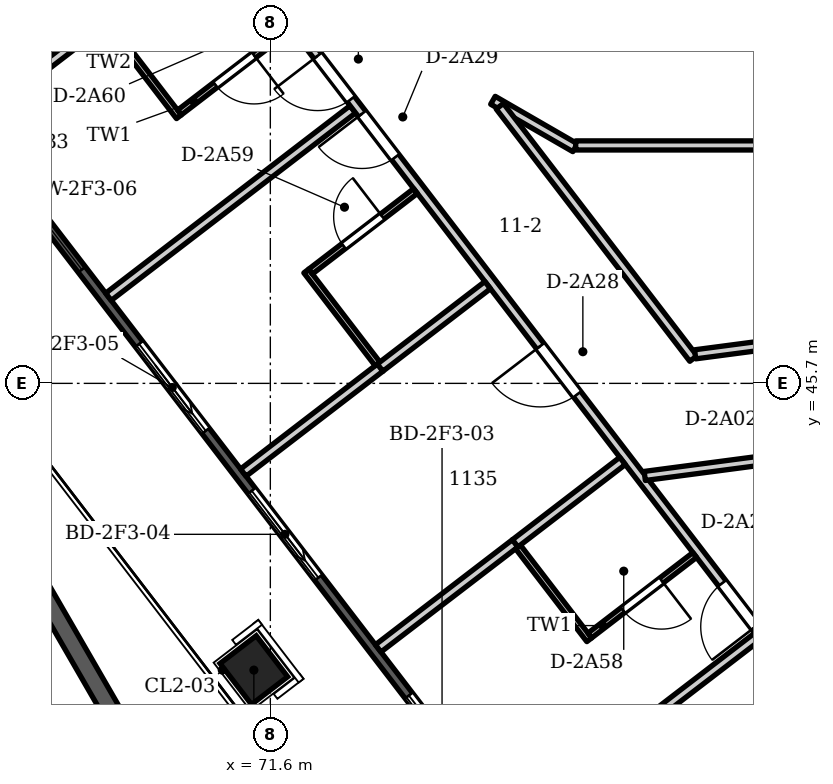
"""IFC4 building model, lengths in metres.
Left out: names, types, materials, properties, quantities, classifications, styles, units other than length and angle.
Written with IfcOpenShell. Run it as: python <this file> out.ifc"""

import sys

from ifc_helpers import new_model, si_unit, direction, frame, frame_2d, origin, origin_2d, place, context, subcontext, project, spatial, polyline, rectangle, outline, extrude, element, fill, save


model = new_model("IFC4")
c1 = context("Model", 3, precision=1e-05, world=origin(), true_north=direction((0.0, 1.0)))
c2 = subcontext(c1, "Body", "Model", "MODEL_VIEW")
j1 = project(units=[si_unit("LENGTHUNIT", "METRE"), si_unit("PLANEANGLEUNIT", "RADIAN")], contexts=[c1])
p1 = place(None, origin())
s1 = spatial("IfcSite", under=j1, at=p1, CompositionType="ELEMENT")
p2 = place(p1, origin())
s2 = spatial("IfcBuilding", under=s1, at=p2, CompositionType="ELEMENT")
p3 = place(p2, frame((0.0, 0.0, 50.4)))
s3 = spatial("IfcBuildingStorey", under=s2, at=p3, CompositionType="ELEMENT", Elevation=50.4)
p4 = place(p3, frame((71.329, 40.985, -0.35), z_axis=(0.0, 0.0, 1.0), x_axis=(-0.608761429009, 0.793353340291, 0.0)))
e1 = element("IfcColumn", 1, at=p4, inside=s3, PredefinedType="COLUMN", context=c2, shape_type="SweptSolid", body=[
    extrude(rectangle(XDim=0.85, YDim=0.75, at=origin_2d()), origin(), (0.0, 0.0, 1.0), 3.95),
])
p5 = place(p3, frame((79.969, 32.624, 0.0), z_axis=(0.0, 0.0, 1.0), x_axis=(-0.608761526367, 0.793353265585, 0.0)))
e2 = element("IfcWall", 2, at=p5, inside=s3, PredefinedType="SOLIDWALL", context=c2, shape_type="SweptSolid", body=[
    extrude(outline(polyline([(0.149, 0.075), (0.149, -0.075), (47.217, -0.075), (47.217, 0.075), (0.149, 0.075)])), origin(), (0.0, 0.0, 1.0), 3.3),
])
p6 = place(p5, frame((1.222, 0.0, 0.0)))
e3 = element("IfcOpeningElement", 3, at=p6, cuts=e2, PredefinedType="OPENING", context=c2, shape_type="SweptSolid", body=[
    extrude(rectangle(XDim=1.8, YDim=2.6, at=frame_2d((0.9, 1.3))), frame((0.0, 0.085, 0.0), z_axis=(0.0, -1.0, 0.0), x_axis=(1.0, 0.0, 0.0)), (0.0, 0.0, 1.0), 0.17),
])
p7 = place(p5, frame((4.565, 0.0, 0.0)))
e4 = element("IfcOpeningElement", 4, at=p7, cuts=e2, PredefinedType="OPENING", context=c2, shape_type="SweptSolid", body=[
    extrude(rectangle(XDim=1.8, YDim=2.6, at=frame_2d((0.9, 1.3))), frame((0.0, 0.085, 0.0), z_axis=(0.0, -1.0, 0.0), x_axis=(1.0, 0.0, 0.0)), (0.0, 0.0, 1.0), 0.17),
])
p8 = place(p5, frame((8.209, 0.0, 0.0)))
e5 = element("IfcOpeningElement", 5, at=p8, cuts=e2, PredefinedType="OPENING", context=c2, shape_type="SweptSolid", body=[
    extrude(rectangle(XDim=1.8, YDim=2.6, at=frame_2d((0.9, 1.3))), frame((0.0, 0.085, 0.0), z_axis=(0.0, -1.0, 0.0), x_axis=(1.0, 0.0, 0.0)), (0.0, 0.0, 1.0), 0.17),
])
p9 = place(p5, frame((12.453, 0.0, 0.0)))
e6 = element("IfcOpeningElement", 6, at=p9, cuts=e2, PredefinedType="OPENING", context=c2, shape_type="SweptSolid", body=[
    extrude(rectangle(XDim=1.8, YDim=2.6, at=frame_2d((0.9, 1.3))), frame((0.0, 0.085, 0.0), z_axis=(0.0, -1.0, 0.0), x_axis=(1.0, 0.0, 0.0)), (0.0, 0.0, 1.0), 0.17),
])
p10 = place(p5, frame((15.496, 0.0, 0.0)))
e7 = element("IfcOpeningElement", 7, at=p10, cuts=e2, PredefinedType="OPENING", context=c2, shape_type="SweptSolid", body=[
    extrude(rectangle(XDim=1.8, YDim=2.6, at=frame_2d((0.9, 1.3))), frame((0.0, 0.085, 0.0), z_axis=(0.0, -1.0, 0.0), x_axis=(1.0, 0.0, 0.0)), (0.0, 0.0, 1.0), 0.17),
])
p11 = place(p5, frame((18.84, 0.0, 0.15)))
e8 = element("IfcOpeningElement", 8, at=p11, cuts=e2, PredefinedType="OPENING", context=c2, shape_type="SweptSolid", body=[
    extrude(rectangle(XDim=2.4, YDim=2.45, at=frame_2d((1.2, 1.225))), frame((0.0, 0.085, 0.0), z_axis=(0.0, -1.0, 0.0), x_axis=(1.0, 0.0, 0.0)), (0.0, 0.0, 1.0), 0.17),
])
p12 = place(p5, frame((22.783, 0.0, 0.0)))
e9 = element("IfcOpeningElement", 9, at=p12, cuts=e2, PredefinedType="OPENING", context=c2, shape_type="SweptSolid", body=[
    extrude(rectangle(XDim=1.8, YDim=2.6, at=frame_2d((0.9, 1.3))), frame((0.0, 0.085, 0.0), z_axis=(0.0, -1.0, 0.0), x_axis=(1.0, 0.0, 0.0)), (0.0, 0.0, 1.0), 0.17),
])
p13 = place(p5, frame((26.127, 0.0, 0.15)))
e10 = element("IfcOpeningElement", 10, at=p13, cuts=e2, PredefinedType="OPENING", context=c2, shape_type="SweptSolid", body=[
    extrude(rectangle(XDim=2.4, YDim=2.45, at=frame_2d((1.2, 1.225))), frame((0.0, 0.085, 0.0), z_axis=(0.0, -1.0, 0.0), x_axis=(1.0, 0.0, 0.0)), (0.0, 0.0, 1.0), 0.17),
])
p14 = place(p5, frame((30.071, 0.0, 0.0)))
e11 = element("IfcOpeningElement", 11, at=p14, cuts=e2, PredefinedType="OPENING", context=c2, shape_type="SweptSolid", body=[
    extrude(rectangle(XDim=1.8, YDim=2.6, at=frame_2d((0.9, 1.3))), frame((0.0, 0.085, 0.0), z_axis=(0.0, -1.0, 0.0), x_axis=(1.0, 0.0, 0.0)), (0.0, 0.0, 1.0), 0.17),
])
p15 = place(p5, frame((33.114, 0.0, 0.0)))
e12 = element("IfcOpeningElement", 12, at=p15, cuts=e2, PredefinedType="OPENING", context=c2, shape_type="SweptSolid", body=[
    extrude(rectangle(XDim=1.8, YDim=2.6, at=frame_2d((0.9, 1.3))), frame((0.0, 0.085, 0.0), z_axis=(0.0, -1.0, 0.0), x_axis=(1.0, 0.0, 0.0)), (0.0, 0.0, 1.0), 0.17),
])
p16 = place(p5, frame((37.358, 0.0, 0.0)))
e13 = element("IfcOpeningElement", 13, at=p16, cuts=e2, PredefinedType="OPENING", context=c2, shape_type="SweptSolid", body=[
    extrude(rectangle(XDim=1.8, YDim=2.6, at=frame_2d((0.9, 1.3))), frame((0.0, 0.085, 0.0), z_axis=(0.0, -1.0, 0.0), x_axis=(1.0, 0.0, 0.0)), (0.0, 0.0, 1.0), 0.17),
])
p17 = place(p5, frame((41.001, 0.0, 0.0)))
e14 = element("IfcOpeningElement", 14, at=p17, cuts=e2, PredefinedType="OPENING", context=c2, shape_type="SweptSolid", body=[
    extrude(rectangle(XDim=1.8, YDim=2.6, at=frame_2d((0.9, 1.3))), frame((0.0, 0.085, 0.0), z_axis=(0.0, -1.0, 0.0), x_axis=(1.0, 0.0, 0.0)), (0.0, 0.0, 1.0), 0.17),
])
p18 = place(p5, frame((44.345, 0.0, 0.0)))
e15 = element("IfcOpeningElement", 15, at=p18, cuts=e2, PredefinedType="OPENING", context=c2, shape_type="SweptSolid", body=[
    extrude(rectangle(XDim=1.8, YDim=2.6, at=frame_2d((0.9, 1.3))), frame((0.0, 0.085, 0.0), z_axis=(0.0, -1.0, 0.0), x_axis=(1.0, 0.0, 0.0)), (0.0, 0.0, 1.0), 0.17),
])
p19 = place(p3, origin())
e16 = element("IfcWall", 16, at=p19, inside=s3, PredefinedType="PARAPET", context=c2, shape_type="SweptSolid", body=[
    extrude(outline(polyline([(61.885, 52.307), (76.536, 26.931), (76.709, 27.231), (63.284, 50.483), (61.885, 52.307)])), origin(), (0.0, 0.0, 1.0), 1.1),
])
p20 = place(p3, frame((66.72, 50.014, 0.0), z_axis=(0.0, 0.0, 1.0), x_axis=(0.793383103562, 0.608722638796, 0.0)))
e17 = element("IfcWall", 17, at=p20, inside=s3, PredefinedType="PARTITIONING", context=c2, shape_type="SweptSolid", body=[
    extrude(rectangle(XDim=5.017, YDim=0.15, at=frame_2d((2.509, 0.0))), origin(), (0.0, 0.0, 1.0), 3.3),
])
p21 = place(p3, frame((68.925, 51.612, 0.0), z_axis=(0.0, 0.0, 1.0), x_axis=(0.608649853766, -0.793438942522, 0.0)))
e18 = element("IfcWall", 18, at=p21, inside=s3, PredefinedType="PARTITIONING", context=c2, shape_type="SweptSolid", body=[
    extrude(rectangle(XDim=1.925, YDim=0.1, at=frame_2d((0.962, 0.0))), origin(), (0.0, 0.0, 1.0), 3.3),
])
p22 = place(p3, frame((68.938, 47.123, 0.0), z_axis=(0.0, 0.0, 1.0), x_axis=(0.793351017656, 0.608764455913, 0.0)))
e19 = element("IfcWall", 19, at=p22, inside=s3, PredefinedType="PARTITIONING", context=c2, shape_type="SweptSolid", body=[
    extrude(rectangle(XDim=5.064, YDim=0.15, at=frame_2d((2.532, 0.0))), origin(), (0.0, 0.0, 1.0), 3.3),
])
p23 = place(p3, frame((70.106, 50.154, 0.0), z_axis=(0.0, 0.0, 1.0), x_axis=(0.793486347076, 0.608588051972, 0.0)))
e20 = element("IfcWall", 20, at=p23, inside=s3, PredefinedType="PARTITIONING", context=c2, shape_type="SweptSolid", body=[
    extrude(rectangle(XDim=2.292, YDim=0.1, at=frame_2d((1.146, 0.0))), origin(), (0.0, 0.0, 1.0), 3.3),
])
p24 = place(p23, frame((0.746, 0.0, 0.0)))
e21 = element("IfcOpeningElement", 21, at=p24, cuts=e20, PredefinedType="OPENING", context=c2, shape_type="SweptSolid", body=[
    extrude(rectangle(XDim=0.8, YDim=2.1, at=frame_2d((0.4, 1.05))), frame((0.0, 0.06, 0.0), z_axis=(0.0, -1.0, 0.0), x_axis=(1.0, 0.0, 0.0)), (0.0, 0.0, 1.0), 0.12),
])
p25 = place(p3, frame((71.088, 52.766, 0.0), z_axis=(0.0, 0.0, 1.0), x_axis=(0.608663951432, -0.793428127953, 0.0)))
e22 = element("IfcWall", 22, at=p25, inside=s3, PredefinedType="PARTITIONING", context=c2, shape_type="SweptSolid", body=[
    extrude(rectangle(XDim=17.817, YDim=0.15, at=frame_2d((8.909, 0.0))), origin(), (0.0, 0.0, 1.0), 3.3),
])
p26 = place(p25, frame((13.048, 0.0, 0.0)))
e23 = element("IfcOpeningElement", 23, at=p26, cuts=e22, PredefinedType="OPENING", context=c2, shape_type="SweptSolid", body=[
    extrude(rectangle(XDim=0.9, YDim=2.1, at=frame_2d((0.45, 1.05))), frame((0.0, 0.085, 0.0), z_axis=(0.0, -1.0, 0.0), x_axis=(1.0, 0.0, 0.0)), (0.0, 0.0, 1.0), 0.17),
])
p27 = place(p25, frame((8.133, 0.0, 0.0)))
e24 = element("IfcOpeningElement", 24, at=p27, cuts=e22, PredefinedType="OPENING", context=c2, shape_type="SweptSolid", body=[
    extrude(rectangle(XDim=1.0, YDim=2.1, at=frame_2d((0.5, 1.05))), frame((0.0, 0.085, 0.0), z_axis=(0.0, -1.0, 0.0), x_axis=(1.0, 0.0, 0.0)), (0.0, 0.0, 1.0), 0.17),
])
p28 = place(p25, frame((3.318, 0.0, 0.0)))
e25 = element("IfcOpeningElement", 25, at=p28, cuts=e22, PredefinedType="OPENING", context=c2, shape_type="SweptSolid", body=[
    extrude(rectangle(XDim=0.9, YDim=2.1, at=frame_2d((0.45, 1.05))), frame((0.0, 0.085, 0.0), z_axis=(0.0, -1.0, 0.0), x_axis=(1.0, 0.0, 0.0)), (0.0, 0.0, 1.0), 0.17),
])
p29 = place(p25, frame((2.118, 0.0, 0.0)))
e26 = element("IfcOpeningElement", 26, at=p29, cuts=e22, PredefinedType="OPENING", context=c2, shape_type="SweptSolid", body=[
    extrude(rectangle(XDim=0.9, YDim=2.1, at=frame_2d((0.45, 1.05))), frame((0.0, 0.085, 0.0), z_axis=(0.0, -1.0, 0.0), x_axis=(1.0, 0.0, 0.0)), (0.0, 0.0, 1.0), 0.17),
])
p30 = place(p3, frame((71.156, 44.232, 0.0), z_axis=(0.0, 0.0, 1.0), x_axis=(0.793345018711, 0.60877227375, 0.0)))
e27 = element("IfcWall", 27, at=p30, inside=s3, PredefinedType="PARTITIONING", context=c2, shape_type="SweptSolid", body=[
    extrude(rectangle(XDim=2.843, YDim=0.15, at=frame_2d((1.421, 0.0))), origin(), (0.0, 0.0, 1.0), 3.3),
])
p31 = place(p3, frame((72.191, 47.548, 0.0), z_axis=(0.0, 0.0, 1.0), x_axis=(0.608711106948, -0.793391951231, 0.0)))
e28 = element("IfcWall", 28, at=p31, inside=s3, PredefinedType="PARTITIONING", context=c2, shape_type="SweptSolid", body=[
    extrude(rectangle(XDim=1.925, YDim=0.1, at=frame_2d((0.962, 0.0))), origin(), (0.0, 0.0, 1.0), 3.3),
])
p32 = place(p3, frame((72.261, 47.538, 0.0), z_axis=(0.0, 0.0, 1.0), x_axis=(0.79342025342, 0.608674216197, 0.0)))
e29 = element("IfcWall", 29, at=p32, inside=s3, PredefinedType="PARTITIONING", context=c2, shape_type="SweptSolid", body=[
    extrude(rectangle(XDim=2.175, YDim=0.1, at=frame_2d((1.088, 0.0))), origin(), (0.0, 0.0, 1.0), 3.3),
])
p33 = place(p32, frame((0.688, 0.0, 0.0)))
e30 = element("IfcOpeningElement", 30, at=p33, cuts=e29, PredefinedType="OPENING", context=c2, shape_type="SweptSolid", body=[
    extrude(rectangle(XDim=0.8, YDim=2.1, at=frame_2d((0.4, 1.05))), frame((0.0, 0.06, 0.0), z_axis=(0.0, -1.0, 0.0), x_axis=(1.0, 0.0, 0.0)), (0.0, 0.0, 1.0), 0.12),
])
p34 = place(p3, frame((73.374, 41.342, 0.0), z_axis=(0.0, 0.0, 1.0), x_axis=(0.793546848587, 0.608509161063, 0.0)))
e31 = element("IfcWall", 31, at=p34, inside=s3, PredefinedType="PARTITIONING", context=c2, shape_type="SweptSolid", body=[
    extrude(rectangle(XDim=2.839, YDim=0.15, at=frame_2d((1.42, 0.0))), origin(), (0.0, 0.0, 1.0), 3.3),
])
p35 = place(p3, frame((73.405, 45.959, 0.0), z_axis=(0.0, 0.0, 1.0), x_axis=(0.793486460679, 0.608587903856, 0.0)))
e32 = element("IfcWall", 32, at=p35, inside=s3, PredefinedType="PARTITIONING", context=c2, shape_type="SweptSolid", body=[
    extrude(rectangle(XDim=2.229, YDim=0.15, at=frame_2d((1.114, 0.0))), origin(), (0.0, 0.0, 1.0), 3.3),
])
p36 = place(p3, frame((75.261, 50.355, 0.0), z_axis=(0.0, 0.0, 1.0), x_axis=(0.866029224906, -0.499993381564, 0.0)))
e33 = element("IfcWall", 33, at=p36, inside=s3, PredefinedType="PARTITIONING", context=c2, shape_type="SweptSolid", body=[
    extrude(rectangle(XDim=1.56, YDim=0.15, at=frame_2d((0.78, 0.0))), origin(), (0.0, 0.0, 1.0), 3.3),
])
p37 = place(p3, frame((75.374, 50.258, 0.0), z_axis=(0.0, 0.0, 1.0), x_axis=(0.608769592338, -0.793347076282, 0.0)))
e34 = element("IfcWall", 34, at=p37, inside=s3, PredefinedType="PARTITIONING", context=c2, shape_type="SweptSolid", body=[
    extrude(rectangle(XDim=5.23, YDim=0.15, at=frame_2d((2.615, 0.0))), origin(), (0.0, 0.0, 1.0), 3.3),
])
p38 = place(p3, frame((75.593, 38.451, 0.0), z_axis=(0.0, 0.0, 1.0), x_axis=(0.793302827183, 0.608827253318, 0.0)))
e35 = element("IfcWall", 35, at=p38, inside=s3, PredefinedType="PARTITIONING", context=c2, shape_type="SweptSolid", body=[
    extrude(rectangle(XDim=5.063, YDim=0.15, at=frame_2d((2.532, 0.0))), origin(), (0.0, 0.0, 1.0), 3.3),
])
p39 = place(p3, frame((75.673, 43.01, 0.0), z_axis=(0.0, 0.0, 1.0), x_axis=(0.608790940556, -0.793330694412, 0.0)))
e36 = element("IfcWall", 36, at=p39, inside=s3, PredefinedType="PARTITIONING", context=c2, shape_type="SweptSolid", body=[
    extrude(rectangle(XDim=1.925, YDim=0.1, at=frame_2d((0.962, 0.0))), origin(), (0.0, 0.0, 1.0), 3.3),
])
p40 = place(p3, frame((75.627, 43.07, 0.0), z_axis=(0.0, 0.0, 1.0), x_axis=(0.793313024441, 0.608813966045, 0.0)))
e37 = element("IfcWall", 37, at=p40, inside=s3, PredefinedType="PARTITIONING", context=c2, shape_type="SweptSolid", body=[
    extrude(rectangle(XDim=2.224, YDim=0.15, at=frame_2d((1.112, 0.0))), origin(), (0.0, 0.0, 1.0), 3.3),
])
p41 = place(p3, frame((76.622, 49.613, 0.0), z_axis=(0.0, 0.0, 1.0), x_axis=(1.0, 0.0, 0.0)))
e38 = element("IfcWall", 38, at=p41, inside=s3, PredefinedType="PARTITIONING", context=c2, shape_type="SweptSolid", body=[
    extrude(rectangle(XDim=6.906, YDim=0.15, at=frame_2d((3.453, 0.0))), origin(), (0.0, 0.0, 1.0), 2.75),
])
p42 = place(p3, frame((76.854, 41.553, 0.0), z_axis=(0.0, 0.0, 1.0), x_axis=(0.793308064866, 0.608820428549, 0.0)))
e39 = element("IfcWall", 39, at=p42, inside=s3, PredefinedType="PARTITIONING", context=c2, shape_type="SweptSolid", body=[
    extrude(rectangle(XDim=2.174, YDim=0.1, at=frame_2d((1.087, 0.0))), origin(), (0.0, 0.0, 1.0), 3.3),
])
p43 = place(p42, frame((0.687, 0.0, 0.0)))
e40 = element("IfcOpeningElement", 40, at=p43, cuts=e39, PredefinedType="OPENING", context=c2, shape_type="SweptSolid", body=[
    extrude(rectangle(XDim=0.8, YDim=2.1, at=frame_2d((0.4, 1.05))), frame((0.0, 0.06, 0.0), z_axis=(0.0, -1.0, 0.0), x_axis=(1.0, 0.0, 0.0)), (0.0, 0.0, 1.0), 0.12),
])
p44 = place(p3, frame((77.757, 44.178, 0.0), z_axis=(0.0, 0.0, 1.0), x_axis=(0.99142565409, 0.130672003172, 0.0)))
e41 = element("IfcWall", 41, at=p44, inside=s3, PredefinedType="PARTITIONING", context=c2, shape_type="SweptSolid", body=[
    extrude(rectangle(XDim=2.091, YDim=0.15, at=frame_2d((1.045, 0.0))), origin(), (0.0, 0.0, 1.0), 3.3),
])
p45 = place(p3, frame((78.586, 46.178, 0.0), z_axis=(0.0, 0.0, 1.0), x_axis=(0.991437356371, 0.130583185714, 0.0)))
e42 = element("IfcWall", 42, at=p45, inside=s3, PredefinedType="PARTITIONING", context=c2, shape_type="SweptSolid", body=[
    extrude(rectangle(XDim=7.215, YDim=0.15, at=frame_2d((3.607, 0.0))), origin(), (0.0, 0.0, 1.0), 2.75),
])
p46 = place(p45, frame((3.12, 0.0, 0.0)))
e43 = element("IfcOpeningElement", 43, at=p46, cuts=e42, PredefinedType="OPENING", context=c2, shape_type="SweptSolid", body=[
    extrude(rectangle(XDim=0.9, YDim=2.1, at=frame_2d((0.45, 1.05))), frame((0.0, 0.085, 0.0), z_axis=(0.0, -1.0, 0.0), x_axis=(1.0, 0.0, 0.0)), (0.0, 0.0, 1.0), 0.17),
])
p47 = place(p8, origin())
e44 = element("IfcDoor", 44, at=p47, inside=s3, OperationType="SLIDING_TO_LEFT", PredefinedType="DOOR", context=c2, shape_type="SweptSolid", body=[
    extrude(rectangle(XDim=1.8, YDim=2.6, at=frame_2d((0.9, 1.3))), frame((0.0, 0.025, 0.0), z_axis=(0.0, -1.0, 0.0), x_axis=(1.0, 0.0, 0.0)), (0.0, 0.0, 1.0), 0.05),
])
fill(e5, e44)
p48 = place(p9, origin())
e45 = element("IfcDoor", 45, at=p48, inside=s3, OperationType="SLIDING_TO_LEFT", PredefinedType="DOOR", context=c2, shape_type="SweptSolid", body=[
    extrude(rectangle(XDim=1.8, YDim=2.6, at=frame_2d((0.9, 1.3))), frame((0.0, 0.025, 0.0), z_axis=(0.0, -1.0, 0.0), x_axis=(1.0, 0.0, 0.0)), (0.0, 0.0, 1.0), 0.05),
])
fill(e6, e45)
p49 = place(p10, origin())
e46 = element("IfcDoor", 46, at=p49, inside=s3, OperationType="SLIDING_TO_LEFT", PredefinedType="DOOR", context=c2, shape_type="SweptSolid", body=[
    extrude(rectangle(XDim=1.8, YDim=2.6, at=frame_2d((0.9, 1.3))), frame((0.0, 0.025, 0.0), z_axis=(0.0, -1.0, 0.0), x_axis=(1.0, 0.0, 0.0)), (0.0, 0.0, 1.0), 0.05),
])
fill(e7, e46)
p50 = place(p11, origin())
e47 = element("IfcWindow", 47, at=p50, inside=s3, PartitioningType="SINGLE_PANEL", PredefinedType="WINDOW", context=c2, shape_type="SweptSolid", body=[
    extrude(rectangle(XDim=2.4, YDim=2.45, at=frame_2d((1.2, 1.225))), frame((0.0, 0.03, 0.0), z_axis=(0.0, -1.0, 0.0), x_axis=(1.0, 0.0, 0.0)), (0.0, 0.0, 1.0), 0.06),
])
fill(e8, e47)
p51 = place(p26, frame((0.9, 0.0, 0.0), z_axis=(0.0, 0.0, 1.0), x_axis=(-1.0, 0.0, 0.0)))
e48 = element("IfcDoor", 48, at=p51, inside=s3, OperationType="SINGLE_SWING_LEFT", PredefinedType="DOOR", context=c2, shape_type="SweptSolid", body=[
    extrude(rectangle(XDim=0.9, YDim=2.1, at=frame_2d((0.45, 1.05))), frame((0.0, 0.025, 0.0), z_axis=(0.0, -1.0, 0.0), x_axis=(1.0, 0.0, 0.0)), (0.0, 0.0, 1.0), 0.05),
])
fill(e23, e48)
p52 = place(p27, frame((1.0, 0.0, 0.0), z_axis=(0.0, 0.0, 1.0), x_axis=(-1.0, 0.0, 0.0)))
e49 = element("IfcDoor", 49, at=p52, inside=s3, OperationType="SINGLE_SWING_RIGHT", PredefinedType="DOOR", context=c2, shape_type="SweptSolid", body=[
    extrude(rectangle(XDim=1.0, YDim=2.1, at=frame_2d((0.5, 1.05))), frame((0.0, 0.025, 0.0), z_axis=(0.0, -1.0, 0.0), x_axis=(1.0, 0.0, 0.0)), (0.0, 0.0, 1.0), 0.05),
])
fill(e24, e49)
p53 = place(p28, frame((0.9, 0.0, 0.0), z_axis=(0.0, 0.0, 1.0), x_axis=(-1.0, 0.0, 0.0)))
e50 = element("IfcDoor", 50, at=p53, inside=s3, OperationType="SINGLE_SWING_RIGHT", PredefinedType="DOOR", context=c2, shape_type="SweptSolid", body=[
    extrude(rectangle(XDim=0.9, YDim=2.1, at=frame_2d((0.45, 1.05))), frame((0.0, 0.025, 0.0), z_axis=(0.0, -1.0, 0.0), x_axis=(1.0, 0.0, 0.0)), (0.0, 0.0, 1.0), 0.05),
])
fill(e25, e50)
p54 = place(p29, frame((0.9, 0.0, 0.0), z_axis=(0.0, 0.0, 1.0), x_axis=(-1.0, 0.0, 0.0)))
e51 = element("IfcDoor", 51, at=p54, inside=s3, OperationType="SINGLE_SWING_RIGHT", PredefinedType="DOOR", context=c2, shape_type="SweptSolid", body=[
    extrude(rectangle(XDim=0.9, YDim=2.1, at=frame_2d((0.45, 1.05))), frame((0.0, 0.025, 0.0), z_axis=(0.0, -1.0, 0.0), x_axis=(1.0, 0.0, 0.0)), (0.0, 0.0, 1.0), 0.05),
])
fill(e26, e51)
p55 = place(p43, frame((0.8, 0.0, 0.0), z_axis=(0.0, 0.0, 1.0), x_axis=(-1.0, 0.0, 0.0)))
e52 = element("IfcDoor", 52, at=p55, inside=s3, OperationType="SINGLE_SWING_LEFT", PredefinedType="DOOR", context=c2, shape_type="SweptSolid", body=[
    extrude(rectangle(XDim=0.8, YDim=2.1, at=frame_2d((0.4, 1.05))), frame((0.0, 0.025, 0.0), z_axis=(0.0, -1.0, 0.0), x_axis=(1.0, 0.0, 0.0)), (0.0, 0.0, 1.0), 0.05),
])
fill(e40, e52)
p56 = place(p33, origin())
e53 = element("IfcDoor", 53, at=p56, inside=s3, OperationType="SINGLE_SWING_RIGHT", PredefinedType="DOOR", context=c2, shape_type="SweptSolid", body=[
    extrude(rectangle(XDim=0.8, YDim=2.1, at=frame_2d((0.4, 1.05))), frame((0.0, 0.025, 0.0), z_axis=(0.0, -1.0, 0.0), x_axis=(1.0, 0.0, 0.0)), (0.0, 0.0, 1.0), 0.05),
])
fill(e30, e53)
p57 = place(p24, frame((0.8, 0.0, 0.0), z_axis=(0.0, 0.0, 1.0), x_axis=(-1.0, 0.0, 0.0)))
e54 = element("IfcDoor", 54, at=p57, inside=s3, OperationType="SINGLE_SWING_LEFT", PredefinedType="DOOR", context=c2, shape_type="SweptSolid", body=[
    extrude(rectangle(XDim=0.8, YDim=2.1, at=frame_2d((0.4, 1.05))), frame((0.0, 0.025, 0.0), z_axis=(0.0, -1.0, 0.0), x_axis=(1.0, 0.0, 0.0)), (0.0, 0.0, 1.0), 0.05),
])
fill(e21, e54)
save(model, sys.argv[1])
